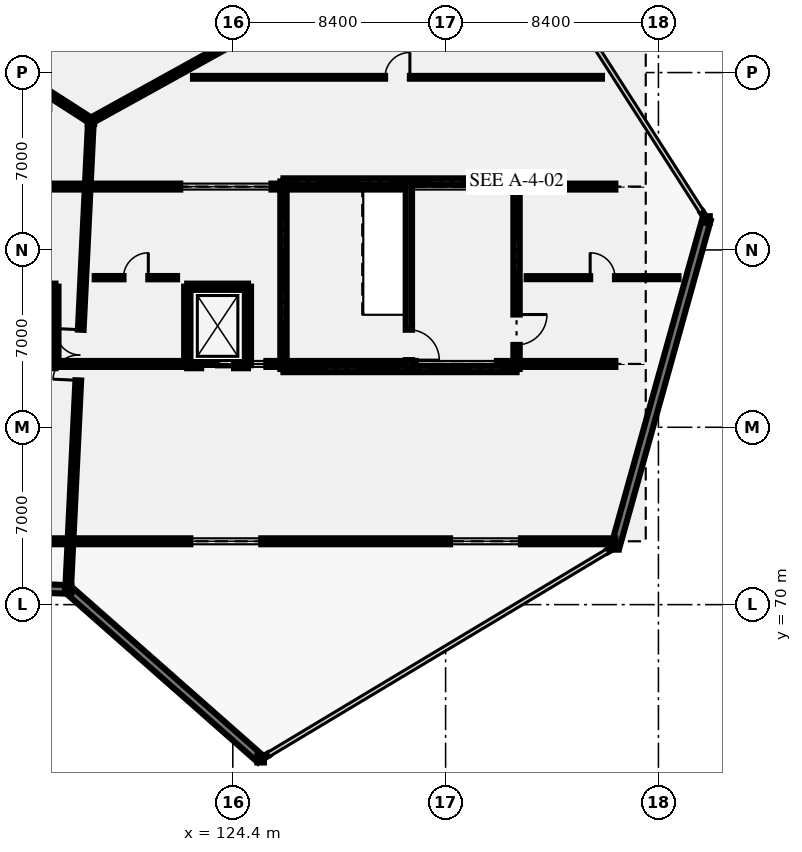
"""IFC4 building model, lengths in metres.
Left out: names, types, materials, properties, quantities, classifications, styles, units other than length and angle.
Written with IfcOpenShell. Run it as: python <this file> out.ifc"""

import sys

from ifc_helpers import new_model, si_unit, direction, frame, frame_2d, origin, origin_2d, place, context, subcontext, project, spatial, rectangle, i_section, extrude, element, fill, save


model = new_model("IFC4")
c1 = context("Model", 3, precision=1e-05, world=origin(), true_north=direction((0.0, 1.0)))
c2 = subcontext(c1, "Body", "Model", "MODEL_VIEW")
j1 = project(units=[si_unit("LENGTHUNIT", "METRE"), si_unit("PLANEANGLEUNIT", "RADIAN")], contexts=[c1])
p1 = place(None, origin())
s1 = spatial("IfcSite", under=j1, at=p1, CompositionType="ELEMENT")
p2 = place(p1, origin())
s2 = spatial("IfcBuilding", under=s1, at=p2, CompositionType="ELEMENT")
p3 = place(p2, frame((0.0, 0.0, 28.8)))
s3 = spatial("IfcBuildingStorey", under=s2, at=p3, CompositionType="ELEMENT", Elevation=28.8)
for number, where, z_axis, x_axis in (
    (1, (117.9, 70.6, 0.0), (0.0, 0.0, 1.0), (1.0, 0.0, 0.0)),
    (2, (118.8, 89.1, 0.0), (0.0, 0.0, 1.0), (1.0, 0.0, 0.0)),
    (3, (125.5, 63.9, 0.0), (0.0, 0.0, 1.0), (1.0, 0.0, 0.0)),
    (4, (139.5, 72.3, 0.0), (0.0, 0.0, 1.0), (1.0, 0.0, 0.0)),
    (5, (143.1, 85.2, 0.0), (0.0, 0.0, 1.0), (1.0, 0.0, 0.0)),
    (6, (126.52, 79.42, 0.0), (0.0, 0.0, 1.0), (1.0, 0.0, 0.0)),
    (7, (135.48, 79.42, 0.0), (0.0, 0.0, 1.0), (1.0, 0.0, 0.0)),
    (8, (135.48, 86.58, 0.0), (0.0, 0.0, 1.0), (1.0, 0.0, 0.0)),
    (9, (126.52, 86.58, 0.0), (0.0, 0.0, 1.0), (1.0, 0.0, 0.0)),
):
    element("IfcColumn", number, at=place(p3, frame(where, z_axis=z_axis, x_axis=x_axis)), inside=s3, PredefinedType="COLUMN", context=c2, shape_type="SweptSolid", body=[
        extrude(i_section(OverallWidth=0.256, OverallDepth=0.26, WebThickness=0.01, FlangeThickness=0.017, FilletRadius=0.013, at=origin_2d()), origin(), (0.0, 0.0, 1.0), 6.6),
    ])
p4 = place(p3, frame((117.84, 70.602, 0.0), z_axis=(0.0, 0.0, 1.0), x_axis=(-0.999284381651, 0.037824920194, 0.0)))
e10 = element("IfcWall", 10, at=p4, inside=s3, PredefinedType="SOLIDWALL", context=c2, shape_type="SweptSolid", body=[
    extrude(rectangle(XDim=18.453, YDim=0.34, at=frame_2d((9.227, 0.0))), origin(), (0.0, 0.0, 1.0), 5.42),
])
p5 = place(p3, frame((125.5, 63.9, 0.0), z_axis=(0.0, 0.0, 1.0), x_axis=(-0.750131359252, 0.661288850554, 0.0)))
e11 = element("IfcWall", 11, at=p5, inside=s3, PredefinedType="SOLIDWALL", context=c2, shape_type="SweptSolid", body=[
    extrude(rectangle(XDim=10.072, YDim=0.34, at=frame_2d((5.036, 0.0))), origin(), (0.0, 0.0, 1.0), 5.42),
])
for number, where, z_axis, x_axis in (
    (12, (139.464, 72.278, 0.0), (0.0, 0.0, 1.0), (-0.858, -0.513, 0.0)),
    (13, (125.8, 64.08, 0.0), (0.0, 0.0, 1.0), (-0.858, -0.513, 0.0)),
):
    element("IfcWall", number, at=place(p3, frame(where, z_axis=z_axis, x_axis=x_axis)), inside=s3, PredefinedType="SOLIDWALL", context=c2, shape_type="SweptSolid", body=[
        extrude(rectangle(XDim=0.308, YDim=0.095, at=frame_2d((0.154, 0.0))), origin(), (0.0, 0.0, 1.0), 5.42),
    ])
p6 = place(p3, frame((143.1, 85.2, 0.0), z_axis=(0.0, 0.0, 1.0), x_axis=(-0.268807620494, -0.96319388659, 0.0)))
e14 = element("IfcWall", 14, at=p6, inside=s3, PredefinedType="SOLIDWALL", context=c2, shape_type="SweptSolid", body=[
    extrude(rectangle(XDim=13.393, YDim=0.34, at=frame_2d((6.696, 0.0))), origin(), (0.0, 0.0, 1.0), 5.42),
])
p7 = place(p3, frame((142.911, 85.495, 0.0), z_axis=(0.0, 0.0, 1.0), x_axis=(0.538155087301, -0.842845835258, 0.0)))
e15 = element("IfcWall", 15, at=p7, inside=s3, PredefinedType="SOLIDWALL", context=c2, shape_type="SweptSolid", body=[
    extrude(rectangle(XDim=0.309, YDim=0.095, at=frame_2d((0.154, 0.0))), origin(), (0.0, 0.0, 1.0), 5.42),
])
p8 = place(p3, frame((139.5, 72.5, 6.25), z_axis=(0.0, 0.0, 1.0), x_axis=(-1.0, 0.0, 0.0)))
e16 = element("IfcWall", 16, at=p8, inside=s3, PredefinedType="SOLIDWALL", context=c2, shape_type="SweptSolid", body=[
    extrude(rectangle(XDim=41.0, YDim=0.235, at=frame_2d((20.5, 0.0))), origin(), (0.0, 0.0, 1.0), 3.73),
])
p9 = place(p8, frame((3.725, 0.0, 0.25)))
e17 = element("IfcOpeningElement", 17, at=p9, cuts=e16, PredefinedType="OPENING", context=c2, shape_type="SweptSolid", body=[
    extrude(rectangle(XDim=2.8, YDim=2.2, at=frame_2d((1.4, 1.1))), frame((0.0, 0.127, 0.0), z_axis=(0.0, -1.0, 0.0), x_axis=(1.0, 0.0, 0.0)), (0.0, 0.0, 1.0), 0.255),
])
p10 = place(p8, frame((13.975, 0.0, 0.25)))
e18 = element("IfcOpeningElement", 18, at=p10, cuts=e16, PredefinedType="OPENING", context=c2, shape_type="SweptSolid", body=[
    extrude(rectangle(XDim=2.8, YDim=2.2, at=frame_2d((1.4, 1.1))), frame((0.0, 0.127, 0.0), z_axis=(0.0, -1.0, 0.0), x_axis=(1.0, 0.0, 0.0)), (0.0, 0.0, 1.0), 0.255),
])
p11 = place(p8, frame((24.225, 0.0, 0.25)))
e19 = element("IfcOpeningElement", 19, at=p11, cuts=e16, PredefinedType="OPENING", context=c2, shape_type="SweptSolid", body=[
    extrude(rectangle(XDim=2.8, YDim=2.2, at=frame_2d((1.4, 1.1))), frame((0.0, 0.127, 0.0), z_axis=(0.0, -1.0, 0.0), x_axis=(1.0, 0.0, 0.0)), (0.0, 0.0, 1.0), 0.255),
])
p12 = place(p8, frame((34.475, 0.0, 0.25)))
e20 = element("IfcOpeningElement", 20, at=p12, cuts=e16, PredefinedType="OPENING", context=c2, shape_type="SweptSolid", body=[
    extrude(rectangle(XDim=2.8, YDim=2.2, at=frame_2d((1.4, 1.1))), frame((0.0, 0.127, 0.0), z_axis=(0.0, -1.0, 0.0), x_axis=(1.0, 0.0, 0.0)), (0.0, 0.0, 1.0), 0.255),
])
p13 = place(p3, frame((139.5, 79.5, 6.25), z_axis=(0.0, 0.0, 1.0), x_axis=(-1.0, 0.0, 0.0)))
e21 = element("IfcWall", 21, at=p13, inside=s3, PredefinedType="SOLIDWALL", context=c2, shape_type="SweptSolid", body=[
    extrude(rectangle(XDim=41.0, YDim=0.235, at=frame_2d((20.5, 0.0))), origin(), (0.0, 0.0, 1.0), 5.13),
])
p14 = place(p13, frame((4.675, 0.0, 0.25)))
e22 = element("IfcOpeningElement", 22, at=p14, cuts=e21, PredefinedType="OPENING", context=c2, shape_type="SweptSolid", body=[
    extrude(rectangle(XDim=3.2, YDim=2.4, at=frame_2d((1.6, 1.2))), frame((0.0, 0.127, 0.0), z_axis=(0.0, -1.0, 0.0), x_axis=(1.0, 0.0, 0.0)), (0.0, 0.0, 1.0), 0.255),
])
p15 = place(p13, frame((13.775, 0.0, 0.25)))
e23 = element("IfcOpeningElement", 23, at=p15, cuts=e21, PredefinedType="OPENING", context=c2, shape_type="SweptSolid", body=[
    extrude(rectangle(XDim=3.2, YDim=2.4, at=frame_2d((1.6, 1.2))), frame((0.0, 0.127, 0.0), z_axis=(0.0, -1.0, 0.0), x_axis=(1.0, 0.0, 0.0)), (0.0, 0.0, 1.0), 0.255),
])
p16 = place(p13, frame((24.025, 0.0, 0.25)))
e24 = element("IfcOpeningElement", 24, at=p16, cuts=e21, PredefinedType="OPENING", context=c2, shape_type="SweptSolid", body=[
    extrude(rectangle(XDim=3.2, YDim=2.4, at=frame_2d((1.6, 1.2))), frame((0.0, 0.127, 0.0), z_axis=(0.0, -1.0, 0.0), x_axis=(1.0, 0.0, 0.0)), (0.0, 0.0, 1.0), 0.255),
])
p17 = place(p13, frame((34.275, 0.0, 0.25)))
e25 = element("IfcOpeningElement", 25, at=p17, cuts=e21, PredefinedType="OPENING", context=c2, shape_type="SweptSolid", body=[
    extrude(rectangle(XDim=3.2, YDim=2.4, at=frame_2d((1.6, 1.2))), frame((0.0, 0.127, 0.0), z_axis=(0.0, -1.0, 0.0), x_axis=(1.0, 0.0, 0.0)), (0.0, 0.0, 1.0), 0.255),
])
p18 = place(p3, frame((139.5, 86.5, 6.25), z_axis=(0.0, 0.0, 1.0), x_axis=(-1.0, 0.0, 0.0)))
e26 = element("IfcWall", 26, at=p18, inside=s3, PredefinedType="SOLIDWALL", context=c2, shape_type="SweptSolid", body=[
    extrude(rectangle(XDim=41.0, YDim=0.235, at=frame_2d((20.5, 0.0))), origin(), (0.0, 0.0, 1.0), 5.13),
])
p19 = place(p18, frame((4.475, 0.0, 0.25)))
e27 = element("IfcOpeningElement", 27, at=p19, cuts=e26, PredefinedType="OPENING", context=c2, shape_type="SweptSolid", body=[
    extrude(rectangle(XDim=3.6, YDim=2.4, at=frame_2d((1.8, 1.2))), frame((0.0, 0.127, 0.0), z_axis=(0.0, -1.0, 0.0), x_axis=(1.0, 0.0, 0.0)), (0.0, 0.0, 1.0), 0.255),
])
p20 = place(p18, frame((13.575, 0.0, 0.25)))
e28 = element("IfcOpeningElement", 28, at=p20, cuts=e26, PredefinedType="OPENING", context=c2, shape_type="SweptSolid", body=[
    extrude(rectangle(XDim=3.6, YDim=2.4, at=frame_2d((1.8, 1.2))), frame((0.0, 0.127, 0.0), z_axis=(0.0, -1.0, 0.0), x_axis=(1.0, 0.0, 0.0)), (0.0, 0.0, 1.0), 0.255),
])
p21 = place(p18, frame((23.825, 0.0, 0.25)))
e29 = element("IfcOpeningElement", 29, at=p21, cuts=e26, PredefinedType="OPENING", context=c2, shape_type="SweptSolid", body=[
    extrude(rectangle(XDim=3.6, YDim=2.4, at=frame_2d((1.8, 1.2))), frame((0.0, 0.127, 0.0), z_axis=(0.0, -1.0, 0.0), x_axis=(1.0, 0.0, 0.0)), (0.0, 0.0, 1.0), 0.255),
])
p22 = place(p18, frame((34.075, 0.0, 0.25)))
e30 = element("IfcOpeningElement", 30, at=p22, cuts=e26, PredefinedType="OPENING", context=c2, shape_type="SweptSolid", body=[
    extrude(rectangle(XDim=3.6, YDim=2.4, at=frame_2d((1.8, 1.2))), frame((0.0, 0.127, 0.0), z_axis=(0.0, -1.0, 0.0), x_axis=(1.0, 0.0, 0.0)), (0.0, 0.0, 1.0), 0.255),
])
p23 = place(p3, frame((117.9, 70.6, 0.0), z_axis=(0.0, 0.0, 1.0), x_axis=(0.048599072515, 0.998818366947, 0.0)))
e31 = element("IfcWall", 31, at=p23, inside=s3, PredefinedType="SOLIDWALL", context=c2, shape_type="SweptSolid", body=[
    extrude(rectangle(XDim=18.522, YDim=0.225, at=frame_2d((9.261, 0.0))), origin(), (0.0, 0.0, 1.0), 5.82),
])
p24 = place(p23, frame((8.261, 0.0, 0.0)))
e32 = element("IfcOpeningElement", 32, at=p24, cuts=e31, PredefinedType="OPENING", context=c2, shape_type="SweptSolid", body=[
    extrude(rectangle(XDim=2.0, YDim=2.5, at=frame_2d((1.0, 1.25))), frame((0.0, 0.123, 0.0), z_axis=(0.0, -1.0, 0.0), x_axis=(1.0, 0.0, 0.0)), (0.0, 0.0, 1.0), 0.245),
])
p25 = place(p3, frame((118.8, 89.1, 0.0), z_axis=(0.0, 0.0, 1.0), x_axis=(-0.841183241423, 0.540750177392, 0.0)))
e33 = element("IfcWall", 33, at=p25, inside=s3, PredefinedType="SOLIDWALL", context=c2, shape_type="SweptSolid", body=[
    extrude(rectangle(XDim=18.308, YDim=0.225, at=frame_2d((9.154, 0.0))), origin(), (0.0, 0.0, 1.0), 5.82),
])
p26 = place(p25, frame((8.229, 0.0, 0.0)))
e34 = element("IfcOpeningElement", 34, at=p26, cuts=e33, PredefinedType="OPENING", context=c2, shape_type="SweptSolid", body=[
    extrude(rectangle(XDim=1.85, YDim=2.4, at=frame_2d((0.925, 1.2))), frame((0.0, 0.123, 0.0), z_axis=(0.0, -1.0, 0.0), x_axis=(1.0, 0.0, 0.0)), (0.0, 0.0, 1.0), 0.245),
])
p27 = place(p3, frame((134.9, 98.0, 0.0), z_axis=(0.0, 0.0, 1.0), x_axis=(-0.875181353329, -0.483794996652, 0.0)))
e35 = element("IfcWall", 35, at=p27, inside=s3, PredefinedType="SOLIDWALL", context=c2, shape_type="SweptSolid", body=[
    extrude(rectangle(XDim=18.396, YDim=0.225, at=frame_2d((9.198, 0.0))), origin(), (0.0, 0.0, 1.0), 5.82),
])
p28 = place(p27, frame((8.098, 0.0, 0.0)))
e36 = element("IfcOpeningElement", 36, at=p28, cuts=e35, PredefinedType="OPENING", context=c2, shape_type="SweptSolid", body=[
    extrude(rectangle(XDim=2.2, YDim=2.6, at=frame_2d((1.1, 1.3))), frame((0.0, 0.123, 0.0), z_axis=(0.0, -1.0, 0.0), x_axis=(1.0, 0.0, 0.0)), (0.0, 0.0, 1.0), 0.245),
])
p29 = place(p3, frame((118.949, 82.905, 0.0), z_axis=(0.0, 0.0, 1.0), x_axis=(1.0, 0.0, 0.0)))
e37 = element("IfcWall", 37, at=p29, inside=s3, PredefinedType="PARTITIONING", context=c2, shape_type="SweptSolid", body=[
    extrude(rectangle(XDim=3.251, YDim=0.13, at=frame_2d((1.625, 0.0))), origin(), (0.0, 0.0, 1.0), 5.12),
])
p30 = place(p29, frame((1.136, 0.0, 0.0)))
e38 = element("IfcOpeningElement", 38, at=p30, cuts=e37, PredefinedType="OPENING", context=c2, shape_type="SweptSolid", body=[
    extrude(rectangle(XDim=0.98, YDim=2.15, at=frame_2d((0.49, 1.075))), frame((0.0, 0.075, 0.0), z_axis=(0.0, -1.0, 0.0), x_axis=(1.0, 0.0, 0.0)), (0.0, 0.0, 1.0), 0.15),
])
p31 = place(p3, frame((136.0, 82.905, 0.0), z_axis=(0.0, 0.0, 1.0), x_axis=(1.0, 0.0, 0.0)))
e39 = element("IfcWall", 39, at=p31, inside=s3, PredefinedType="PARTITIONING", context=c2, shape_type="SweptSolid", body=[
    extrude(rectangle(XDim=5.992, YDim=0.12, at=frame_2d((2.996, 0.0))), origin(), (0.0, 0.0, 1.0), 5.12),
])
p32 = place(p31, frame((2.506, 0.0, 0.0)))
e40 = element("IfcOpeningElement", 40, at=p32, cuts=e39, PredefinedType="OPENING", context=c2, shape_type="SweptSolid", body=[
    extrude(rectangle(XDim=0.98, YDim=2.15, at=frame_2d((0.49, 1.075))), frame((0.0, 0.07, 0.0), z_axis=(0.0, -1.0, 0.0), x_axis=(1.0, 0.0, 0.0)), (0.0, 0.0, 1.0), 0.14),
])
p33 = place(p3, frame((122.829, 90.813, 0.0), z_axis=(0.0, 0.0, 1.0), x_axis=(1.0, 0.0, 0.0)))
e41 = element("IfcWall", 41, at=p33, inside=s3, PredefinedType="PARTITIONING", context=c2, shape_type="SweptSolid", body=[
    extrude(rectangle(XDim=16.141, YDim=0.11, at=frame_2d((8.07, 0.0))), origin(), (0.0, 0.0, 1.0), 5.12),
])
p34 = place(p33, frame((7.581, 0.0, 0.0)))
e42 = element("IfcOpeningElement", 42, at=p34, cuts=e41, PredefinedType="OPENING", context=c2, shape_type="SweptSolid", body=[
    extrude(rectangle(XDim=0.98, YDim=2.15, at=frame_2d((0.49, 1.075))), frame((0.0, 0.065, 0.0), z_axis=(0.0, -1.0, 0.0), x_axis=(1.0, 0.0, 0.0)), (0.0, 0.0, 1.0), 0.13),
])
p35 = place(p3, frame((126.4, 79.3, 0.0), z_axis=(0.0, 0.0, 1.0), x_axis=(0.0, 1.0, 0.0)))
e43 = element("IfcWall", 43, at=p35, inside=s3, PredefinedType="SHEAR", context=c2, shape_type="SweptSolid", body=[
    extrude(rectangle(XDim=7.4, YDim=0.25, at=frame_2d((3.7, 0.0))), origin(), (0.0, 0.0, 1.0), 6.36),
])
for number, where, z_axis, x_axis in (
    (44, (126.4, 86.7, 0.0), (0.0, 0.0, 1.0), (1.0, 0.0, 0.0)),
    (45, (135.6, 79.3, 0.0), (0.0, 0.0, 1.0), (-1.0, 0.0, 0.0)),
):
    element("IfcWall", number, at=place(p3, frame(where, z_axis=z_axis, x_axis=x_axis)), inside=s3, PredefinedType="SHEAR", context=c2, shape_type="SweptSolid", body=[
        extrude(rectangle(XDim=9.2, YDim=0.25, at=frame_2d((4.6, 0.0))), origin(), (0.0, 0.0, 1.0), 6.36),
    ])
p36 = place(p3, frame((135.6, 86.7, 0.0), z_axis=(0.0, 0.0, 1.0), x_axis=(0.0, -1.0, 0.0)))
e46 = element("IfcWall", 46, at=p36, inside=s3, PredefinedType="SHEAR", context=c2, shape_type="SweptSolid", body=[
    extrude(rectangle(XDim=7.4, YDim=0.25, at=frame_2d((3.7, 0.0))), origin(), (0.0, 0.0, 1.0), 6.36),
])
p37 = place(p36, frame((5.25, 0.0, 0.0)))
e47 = element("IfcOpeningElement", 47, at=p37, cuts=e46, PredefinedType="OPENING", context=c2, shape_type="SweptSolid", body=[
    extrude(rectangle(XDim=1.2, YDim=2.2, at=frame_2d((0.6, 1.1))), frame((0.0, 0.135, 0.0), z_axis=(0.0, -1.0, 0.0), x_axis=(1.0, 0.0, 0.0)), (0.0, 0.0, 1.0), 0.27),
])
p38 = place(p3, frame((131.35, 86.7, 0.0), z_axis=(0.0, 0.0, 1.0), x_axis=(0.0, -1.0, 0.0)))
e48 = element("IfcWall", 48, at=p38, inside=s3, PredefinedType="SHEAR", context=c2, shape_type="SweptSolid", body=[
    extrude(rectangle(XDim=7.4, YDim=0.25, at=frame_2d((3.7, 0.0))), origin(), (0.0, 0.0, 1.0), 6.36),
])
p39 = place(p38, frame((5.85, 0.0, 0.0)))
e49 = element("IfcOpeningElement", 49, at=p39, cuts=e48, PredefinedType="OPENING", context=c2, shape_type="SweptSolid", body=[
    extrude(rectangle(XDim=1.2, YDim=2.2, at=frame_2d((0.6, 1.1))), frame((0.0, 0.135, 0.0), z_axis=(0.0, -1.0, 0.0), x_axis=(1.0, 0.0, 0.0)), (0.0, 0.0, 1.0), 0.27),
])
p40 = place(p3, frame((115.0, 82.55, 0.0), z_axis=(0.0, 0.0, 1.0), x_axis=(1.0, 0.0, 0.0)))
e50 = element("IfcWall", 50, at=p40, inside=s3, PredefinedType="SHEAR", context=c2, shape_type="SweptSolid", body=[
    extrude(rectangle(XDim=2.4, YDim=0.24, at=frame_2d((1.2, 0.0))), origin(), (0.0, 0.0, 1.0), 6.2),
])
p41 = place(p3, frame((117.4, 82.55, 0.0), z_axis=(0.0, 0.0, 1.0), x_axis=(0.0, -1.0, 0.0)))
e51 = element("IfcWall", 51, at=p41, inside=s3, PredefinedType="SHEAR", context=c2, shape_type="SweptSolid", body=[
    extrude(rectangle(XDim=3.1, YDim=0.24, at=frame_2d((1.55, 0.0))), origin(), (0.0, 0.0, 1.0), 6.2),
])
p42 = place(p3, frame((117.4, 79.45, 0.0), z_axis=(0.0, 0.0, 1.0), x_axis=(-1.0, 0.0, 0.0)))
e52 = element("IfcWall", 52, at=p42, inside=s3, PredefinedType="SHEAR", context=c2, shape_type="SweptSolid", body=[
    extrude(rectangle(XDim=2.4, YDim=0.24, at=frame_2d((1.2, 0.0))), origin(), (0.0, 0.0, 1.0), 6.2),
])
p43 = place(p42, frame((0.55, 0.0, 0.0)))
e53 = element("IfcOpeningElement", 53, at=p43, cuts=e52, PredefinedType="OPENING", context=c2, shape_type="SweptSolid", body=[
    extrude(rectangle(XDim=1.3, YDim=2.25, at=frame_2d((0.65, 1.125))), frame((0.0, 0.13, 0.0), z_axis=(0.0, -1.0, 0.0), x_axis=(1.0, 0.0, 0.0)), (0.0, 0.0, 1.0), 0.26),
])
p44 = place(p3, frame((122.6, 82.55, 0.0), z_axis=(0.0, 0.0, 1.0), x_axis=(1.0, 0.0, 0.0)))
e54 = element("IfcWall", 54, at=p44, inside=s3, PredefinedType="SHEAR", context=c2, shape_type="SweptSolid", body=[
    extrude(rectangle(XDim=2.4, YDim=0.24, at=frame_2d((1.2, 0.0))), origin(), (0.0, 0.0, 1.0), 6.2),
])
for number, where, z_axis, x_axis in (
    (55, (125.0, 82.55, 0.0), (0.0, 0.0, 1.0), (0.0, -1.0, 0.0)),
    (56, (122.6, 79.45, 0.0), (0.0, 0.0, 1.0), (0.0, 1.0, 0.0)),
):
    element("IfcWall", number, at=place(p3, frame(where, z_axis=z_axis, x_axis=x_axis)), inside=s3, PredefinedType="SHEAR", context=c2, shape_type="SweptSolid", body=[
        extrude(rectangle(XDim=3.1, YDim=0.24, at=frame_2d((1.55, 0.0))), origin(), (0.0, 0.0, 1.0), 6.2),
    ])
p45 = place(p3, frame((125.0, 79.45, 0.0), z_axis=(0.0, 0.0, 1.0), x_axis=(-1.0, 0.0, 0.0)))
e57 = element("IfcWall", 57, at=p45, inside=s3, PredefinedType="SHEAR", context=c2, shape_type="SweptSolid", body=[
    extrude(rectangle(XDim=2.4, YDim=0.24, at=frame_2d((1.2, 0.0))), origin(), (0.0, 0.0, 1.0), 6.2),
])
p46 = place(p45, frame((0.55, 0.0, 0.0)))
e58 = element("IfcOpeningElement", 58, at=p46, cuts=e57, PredefinedType="OPENING", context=c2, shape_type="SweptSolid", body=[
    extrude(rectangle(XDim=1.3, YDim=2.25, at=frame_2d((0.65, 1.125))), frame((0.0, 0.13, 0.0), z_axis=(0.0, -1.0, 0.0), x_axis=(1.0, 0.0, 0.0)), (0.0, 0.0, 1.0), 0.26),
])
p47 = place(p9, origin())
e59 = element("IfcWindow", 59, at=p47, inside=s3, PartitioningType="SINGLE_PANEL", PredefinedType="SKYLIGHT", context=c2, shape_type="SweptSolid", body=[
    extrude(rectangle(XDim=2.8, YDim=2.2, at=frame_2d((1.4, 1.1))), frame((0.0, 0.03, 0.0), z_axis=(0.0, -1.0, 0.0), x_axis=(1.0, 0.0, 0.0)), (0.0, 0.0, 1.0), 0.06),
])
fill(e17, e59)
p48 = place(p10, origin())
e60 = element("IfcWindow", 60, at=p48, inside=s3, PartitioningType="SINGLE_PANEL", PredefinedType="SKYLIGHT", context=c2, shape_type="SweptSolid", body=[
    extrude(rectangle(XDim=2.8, YDim=2.2, at=frame_2d((1.4, 1.1))), frame((0.0, 0.03, 0.0), z_axis=(0.0, -1.0, 0.0), x_axis=(1.0, 0.0, 0.0)), (0.0, 0.0, 1.0), 0.06),
])
fill(e18, e60)
p49 = place(p14, origin())
e61 = element("IfcWindow", 61, at=p49, inside=s3, PartitioningType="SINGLE_PANEL", PredefinedType="SKYLIGHT", context=c2, shape_type="SweptSolid", body=[
    extrude(rectangle(XDim=3.2, YDim=2.4, at=frame_2d((1.6, 1.2))), frame((0.0, 0.03, 0.0), z_axis=(0.0, -1.0, 0.0), x_axis=(1.0, 0.0, 0.0)), (0.0, 0.0, 1.0), 0.06),
])
fill(e22, e61)
p50 = place(p15, origin())
e62 = element("IfcWindow", 62, at=p50, inside=s3, PartitioningType="SINGLE_PANEL", PredefinedType="SKYLIGHT", context=c2, shape_type="SweptSolid", body=[
    extrude(rectangle(XDim=3.2, YDim=2.4, at=frame_2d((1.6, 1.2))), frame((0.0, 0.03, 0.0), z_axis=(0.0, -1.0, 0.0), x_axis=(1.0, 0.0, 0.0)), (0.0, 0.0, 1.0), 0.06),
])
fill(e23, e62)
p51 = place(p19, origin())
e63 = element("IfcWindow", 63, at=p51, inside=s3, PartitioningType="SINGLE_PANEL", PredefinedType="SKYLIGHT", context=c2, shape_type="SweptSolid", body=[
    extrude(rectangle(XDim=3.6, YDim=2.4, at=frame_2d((1.8, 1.2))), frame((0.0, 0.03, 0.0), z_axis=(0.0, -1.0, 0.0), x_axis=(1.0, 0.0, 0.0)), (0.0, 0.0, 1.0), 0.06),
])
fill(e27, e63)
p52 = place(p20, origin())
e64 = element("IfcWindow", 64, at=p52, inside=s3, PartitioningType="SINGLE_PANEL", PredefinedType="SKYLIGHT", context=c2, shape_type="SweptSolid", body=[
    extrude(rectangle(XDim=3.6, YDim=2.4, at=frame_2d((1.8, 1.2))), frame((0.0, 0.03, 0.0), z_axis=(0.0, -1.0, 0.0), x_axis=(1.0, 0.0, 0.0)), (0.0, 0.0, 1.0), 0.06),
])
fill(e28, e64)
p53 = place(p24, origin())
e65 = element("IfcDoor", 65, at=p53, inside=s3, OperationType="DOUBLE_DOOR_SINGLE_SWING", PredefinedType="DOOR", context=c2, shape_type="SweptSolid", body=[
    extrude(rectangle(XDim=2.0, YDim=2.5, at=frame_2d((1.0, 1.25))), frame((0.0, 0.025, 0.0), z_axis=(0.0, -1.0, 0.0), x_axis=(1.0, 0.0, 0.0)), (0.0, 0.0, 1.0), 0.05),
])
fill(e32, e65)
p54 = place(p30, origin())
e66 = element("IfcDoor", 66, at=p54, inside=s3, OperationType="SINGLE_SWING_RIGHT", PredefinedType="DOOR", context=c2, shape_type="SweptSolid", body=[
    extrude(rectangle(XDim=0.98, YDim=2.15, at=frame_2d((0.49, 1.075))), frame((0.0, 0.025, 0.0), z_axis=(0.0, -1.0, 0.0), x_axis=(1.0, 0.0, 0.0)), (0.0, 0.0, 1.0), 0.05),
])
fill(e38, e66)
p55 = place(p32, origin())
e67 = element("IfcDoor", 67, at=p55, inside=s3, OperationType="SINGLE_SWING_LEFT", PredefinedType="DOOR", context=c2, shape_type="SweptSolid", body=[
    extrude(rectangle(XDim=0.98, YDim=2.15, at=frame_2d((0.49, 1.075))), frame((0.0, 0.025, 0.0), z_axis=(0.0, -1.0, 0.0), x_axis=(1.0, 0.0, 0.0)), (0.0, 0.0, 1.0), 0.05),
])
fill(e40, e67)
p56 = place(p34, origin())
e68 = element("IfcDoor", 68, at=p56, inside=s3, OperationType="SINGLE_SWING_RIGHT", PredefinedType="DOOR", context=c2, shape_type="SweptSolid", body=[
    extrude(rectangle(XDim=0.98, YDim=2.15, at=frame_2d((0.49, 1.075))), frame((0.0, 0.025, 0.0), z_axis=(0.0, -1.0, 0.0), x_axis=(1.0, 0.0, 0.0)), (0.0, 0.0, 1.0), 0.05),
])
fill(e42, e68)
p57 = place(p37, origin())
e69 = element("IfcDoor", 69, at=p57, inside=s3, OperationType="SINGLE_SWING_LEFT", PredefinedType="DOOR", context=c2, shape_type="SweptSolid", body=[
    extrude(rectangle(XDim=1.2, YDim=2.2, at=frame_2d((0.6, 1.1))), frame((0.0, 0.025, 0.0), z_axis=(0.0, -1.0, 0.0), x_axis=(1.0, 0.0, 0.0)), (0.0, 0.0, 1.0), 0.05),
])
fill(e47, e69)
p58 = place(p39, origin())
e70 = element("IfcDoor", 70, at=p58, inside=s3, OperationType="SINGLE_SWING_RIGHT", PredefinedType="DOOR", context=c2, shape_type="SweptSolid", body=[
    extrude(rectangle(XDim=1.2, YDim=2.2, at=frame_2d((0.6, 1.1))), frame((0.0, 0.025, 0.0), z_axis=(0.0, -1.0, 0.0), x_axis=(1.0, 0.0, 0.0)), (0.0, 0.0, 1.0), 0.05),
])
fill(e49, e70)
p59 = place(p46, origin())
e71 = element("IfcDoor", 71, at=p59, inside=s3, OperationType="SLIDING_TO_LEFT", PredefinedType="DOOR", context=c2, shape_type="SweptSolid", body=[
    extrude(rectangle(XDim=1.3, YDim=2.25, at=frame_2d((0.65, 1.125))), frame((0.0, 0.025, 0.0), z_axis=(0.0, -1.0, 0.0), x_axis=(1.0, 0.0, 0.0)), (0.0, 0.0, 1.0), 0.05),
])
fill(e58, e71)
save(model, sys.argv[1])
